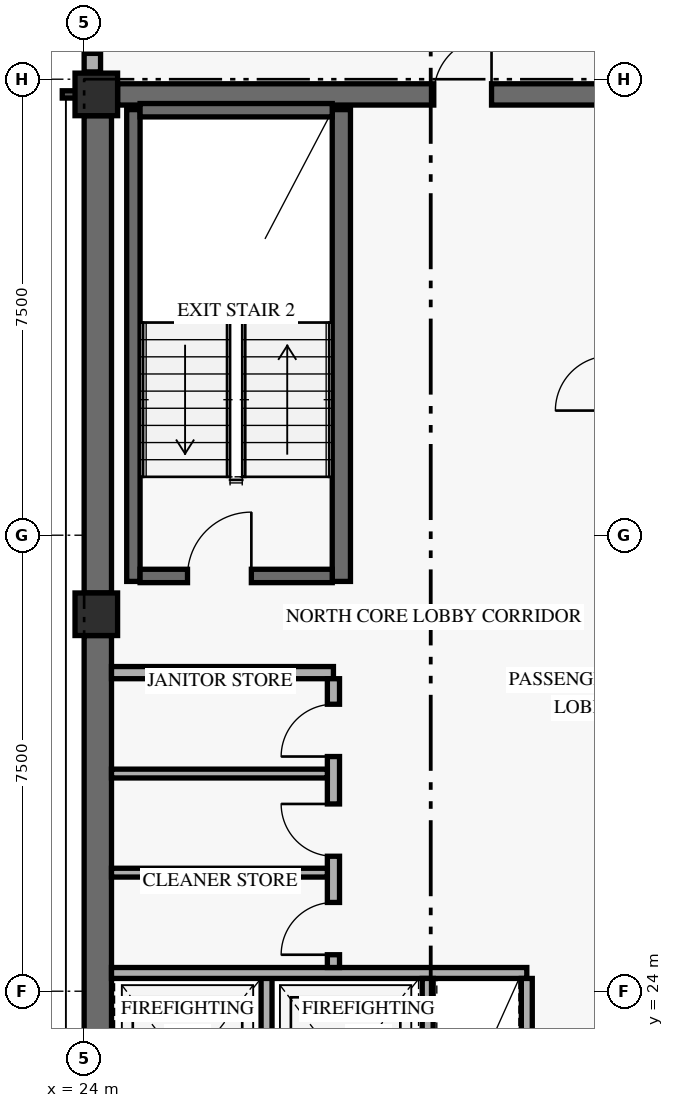
"""IFC4 building model, lengths in metres.
Left out: names, types, materials, properties, quantities, classifications, styles, units other than length and angle.
Written with IfcOpenShell. Run it as: python <this file> out.ifc"""

import sys

from ifc_helpers import new_model, si_unit, direction, frame, frame_2d, origin, origin_2d, place, context, subcontext, project, spatial, rectangle, extrude, element, fill, save


model = new_model("IFC4")
c1 = context("Model", 3, precision=1e-05, world=origin(), true_north=direction((0.0, 1.0)))
c2 = subcontext(c1, "Body", "Model", "MODEL_VIEW")
j1 = project(units=[si_unit("LENGTHUNIT", "METRE"), si_unit("PLANEANGLEUNIT", "RADIAN")], contexts=[c1])
p1 = place(None, origin())
s1 = spatial("IfcSite", under=j1, at=p1, CompositionType="ELEMENT")
p2 = place(p1, origin())
s2 = spatial("IfcBuilding", under=s1, at=p2, CompositionType="ELEMENT")
p3 = place(p2, frame((0.0, 0.0, 256.8)))
s3 = spatial("IfcBuildingStorey", under=s2, at=p3, CompositionType="ELEMENT", Elevation=256.8)
p4 = place(p3, frame((24.225, 17.9, 0.0), z_axis=(0.0, 0.0, 1.0), x_axis=(0.0, 1.0, 0.0)))
e1 = element("IfcWall", 1, at=p4, inside=s3, PredefinedType="SHEAR", context=c2, shape_type="SweptSolid", body=[
    extrude(rectangle(XDim=11.95, YDim=0.45, at=frame_2d((5.975, 0.0))), origin(), (0.0, 0.0, 1.0), 2.821),
])
p5 = place(p3, frame((24.225, 30.55, 0.0), z_axis=(0.0, 0.0, 1.0), x_axis=(0.0, 1.0, 0.0)))
e2 = element("IfcWall", 2, at=p5, inside=s3, PredefinedType="SHEAR", context=c2, shape_type="SweptSolid", body=[
    extrude(rectangle(XDim=7.85, YDim=0.45, at=frame_2d((3.925, 0.0))), origin(), (0.0, 0.0, 1.0), 2.821),
])
p6 = place(p3, frame((24.55, 38.75, 0.0), z_axis=(0.0, 0.0, 1.0), x_axis=(1.0, 0.0, 0.0)))
e3 = element("IfcWall", 3, at=p6, inside=s3, PredefinedType="SHEAR", context=c2, shape_type="SweptSolid", body=[
    extrude(rectangle(XDim=10.3, YDim=0.35, at=frame_2d((5.15, 0.0))), origin(), (0.0, 0.0, 1.0), 3.36),
])
p7 = place(p6, frame((5.2, 0.0, 0.0)))
e4 = element("IfcOpeningElement", 4, at=p7, cuts=e3, PredefinedType="OPENING", context=c2, shape_type="SweptSolid", body=[
    extrude(rectangle(XDim=0.95, YDim=2.15, at=frame_2d((0.475, 1.075))), frame((0.0, 0.185, 0.0), z_axis=(0.0, -1.0, 0.0), x_axis=(1.0, 0.0, 0.0)), (0.0, 0.0, 1.0), 0.37),
])
p8 = place(p3, frame((24.81, 30.74, 0.0), z_axis=(0.0, 0.0, 1.0), x_axis=(0.0, 1.0, 0.0)))
e5 = element("IfcWall", 5, at=p8, inside=s3, PredefinedType="SHEAR", context=c2, shape_type="SweptSolid", body=[
    extrude(rectangle(XDim=7.76, YDim=0.22, at=frame_2d((3.88, 0.0))), origin(), (0.0, 0.0, 1.0), 3.36),
])
p9 = place(p3, frame((28.23, 30.74, 0.0), z_axis=(0.0, 0.0, 1.0), x_axis=(0.0, 1.0, 0.0)))
e6 = element("IfcWall", 6, at=p9, inside=s3, PredefinedType="SHEAR", context=c2, shape_type="SweptSolid", body=[
    extrude(rectangle(XDim=7.76, YDim=0.3, at=frame_2d((3.88, 0.0))), origin(), (0.0, 0.0, 1.0), 3.36),
])
p10 = place(p3, frame((24.92, 30.83, 0.0), z_axis=(0.0, 0.0, 1.0), x_axis=(1.0, 0.0, 0.0)))
e7 = element("IfcWall", 7, at=p10, inside=s3, PredefinedType="SHEAR", context=c2, shape_type="SweptSolid", body=[
    extrude(rectangle(XDim=3.16, YDim=0.22, at=frame_2d((1.58, 0.0))), origin(), (0.0, 0.0, 1.0), 3.36),
])
p11 = place(p10, frame((0.78, 0.0, 0.0)))
e8 = element("IfcOpeningElement", 8, at=p11, cuts=e7, PredefinedType="OPENING", context=c2, shape_type="SweptSolid", body=[
    extrude(rectangle(XDim=1.05, YDim=2.15, at=frame_2d((0.525, 1.075))), frame((0.0, 0.12, 0.0), z_axis=(0.0, -1.0, 0.0), x_axis=(1.0, 0.0, 0.0)), (0.0, 0.0, 1.0), 0.24),
])
p12 = place(p3, frame((24.92, 38.49, 0.0), z_axis=(0.0, 0.0, 1.0), x_axis=(1.0, 0.0, 0.0)))
e9 = element("IfcWall", 9, at=p12, inside=s3, PredefinedType="SHEAR", context=c2, shape_type="SweptSolid", body=[
    extrude(rectangle(XDim=3.16, YDim=0.22, at=frame_2d((1.58, 0.0))), origin(), (0.0, 0.0, 1.0), 3.36),
])
for number, where, z_axis, x_axis in (
    (10, (24.2, 30.2, 0.0), (0.0, 0.0, 1.0), (1.0, 0.0, 0.0)),
    (11, (24.2, 38.75, 0.0), (0.0, 0.0, 1.0), (1.0, 0.0, 0.0)),
):
    element("IfcColumn", number, at=place(p3, frame(where, z_axis=z_axis, x_axis=x_axis)), inside=s3, PredefinedType="COLUMN", context=c2, shape_type="SweptSolid", body=[
        extrude(rectangle(XDim=0.7, YDim=0.7, at=origin_2d()), origin(), (0.0, 0.0, 1.0), 3.6),
    ])
p13 = place(p3, frame((24.135, 39.12, 0.0), z_axis=(0.0, 0.0, 1.0), x_axis=(0.0, 1.0, 0.0)))
e12 = element("IfcWall", 12, at=p13, inside=s3, PredefinedType="SOLIDWALL", context=c2, shape_type="SweptSolid", body=[
    extrude(rectangle(XDim=1.56, YDim=0.27, at=frame_2d((0.78, 0.0))), origin(), (0.0, 0.0, 1.0), 2.803),
])
p14 = place(p13, frame((0.305, 0.0, 0.85)))
e13 = element("IfcOpeningElement", 13, at=p14, cuts=e12, PredefinedType="OPENING", context=c2, shape_type="SweptSolid", body=[
    extrude(rectangle(XDim=0.95, YDim=1.5, at=frame_2d((0.475, 0.75))), frame((0.0, 0.145, 0.0), z_axis=(0.0, -1.0, 0.0), x_axis=(1.0, 0.0, 0.0)), (0.0, 0.0, 1.0), 0.29),
])
p15 = place(p3, frame((27.0, 21.19, 0.0), z_axis=(0.0, 0.0, 1.0), x_axis=(0.0, 1.0, 0.0)))
e14 = element("IfcWall", 14, at=p15, inside=s3, PredefinedType="STANDARD", context=c2, shape_type="SweptSolid", body=[
    extrude(rectangle(XDim=3.11, YDim=0.18, at=frame_2d((1.555, 0.0))), origin(), (0.0, 0.0, 1.0), 3.36),
])
p16 = place(p3, frame((24.45, 24.3, 0.0), z_axis=(0.0, 0.0, 1.0), x_axis=(1.0, 0.0, 0.0)))
e15 = element("IfcWall", 15, at=p16, inside=s3, PredefinedType="STANDARD", context=c2, shape_type="SweptSolid", body=[
    extrude(rectangle(XDim=6.83, YDim=0.18, at=frame_2d((3.415, 0.0))), origin(), (0.0, 0.0, 1.0), 3.36),
])
for number, where, z_axis, x_axis in (
    (16, (29.65, 21.19, 0.0), (0.0, 0.0, 1.0), (0.0, 1.0, 0.0)),
    (17, (31.28, 21.19, 0.0), (0.0, 0.0, 1.0), (0.0, 1.0, 0.0)),
):
    element("IfcWall", number, at=place(p3, frame(where, z_axis=z_axis, x_axis=x_axis)), inside=s3, PredefinedType="STANDARD", context=c2, shape_type="SweptSolid", body=[
        extrude(rectangle(XDim=3.02, YDim=0.18, at=frame_2d((1.51, 0.0))), origin(), (0.0, 0.0, 1.0), 3.36),
    ])
p17 = place(p3, frame((24.45, 29.24, 0.0), z_axis=(0.0, 0.0, 1.0), x_axis=(1.0, 0.0, 0.0)))
e18 = element("IfcWall", 18, at=p17, inside=s3, PredefinedType="STANDARD", context=c2, shape_type="SweptSolid", body=[
    extrude(rectangle(XDim=3.65, YDim=0.2, at=frame_2d((1.825, 0.0))), origin(), (0.0, 0.0, 1.0), 3.36),
])
p18 = place(p3, frame((28.1, 24.39, 0.0), z_axis=(0.0, 0.0, 1.0), x_axis=(0.0, 1.0, 0.0)))
e19 = element("IfcWall", 19, at=p18, inside=s3, PredefinedType="STANDARD", context=c2, shape_type="SweptSolid", body=[
    extrude(rectangle(XDim=4.75, YDim=0.2, at=frame_2d((2.375, 0.0))), origin(), (0.0, 0.0, 1.0), 3.36),
])
p19 = place(p18, frame((0.21, 0.0, 0.0)))
e20 = element("IfcOpeningElement", 20, at=p19, cuts=e19, PredefinedType="OPENING", context=c2, shape_type="SweptSolid", body=[
    extrude(rectangle(XDim=0.86, YDim=2.1, at=frame_2d((0.43, 1.05))), frame((0.0, 0.11, 0.0), z_axis=(0.0, -1.0, 0.0), x_axis=(1.0, 0.0, 0.0)), (0.0, 0.0, 1.0), 0.22),
])
p20 = place(p18, frame((1.83, 0.0, 0.0)))
e21 = element("IfcOpeningElement", 21, at=p20, cuts=e19, PredefinedType="OPENING", context=c2, shape_type="SweptSolid", body=[
    extrude(rectangle(XDim=0.86, YDim=2.1, at=frame_2d((0.43, 1.05))), frame((0.0, 0.11, 0.0), z_axis=(0.0, -1.0, 0.0), x_axis=(1.0, 0.0, 0.0)), (0.0, 0.0, 1.0), 0.22),
])
p21 = place(p18, frame((3.47, 0.0, 0.0)))
e22 = element("IfcOpeningElement", 22, at=p21, cuts=e19, PredefinedType="OPENING", context=c2, shape_type="SweptSolid", body=[
    extrude(rectangle(XDim=0.86, YDim=2.1, at=frame_2d((0.43, 1.05))), frame((0.0, 0.11, 0.0), z_axis=(0.0, -1.0, 0.0), x_axis=(1.0, 0.0, 0.0)), (0.0, 0.0, 1.0), 0.22),
])
for number, where, z_axis, x_axis in (
    (23, (24.45, 25.95, 0.0), (0.0, 0.0, 1.0), (1.0, 0.0, 0.0)),
    (24, (24.45, 27.58, 0.0), (0.0, 0.0, 1.0), (1.0, 0.0, 0.0)),
):
    element("IfcWall", number, at=place(p3, frame(where, z_axis=z_axis, x_axis=x_axis)), inside=s3, PredefinedType="PARTITIONING", context=c2, shape_type="SweptSolid", body=[
        extrude(rectangle(XDim=3.55, YDim=0.145, at=frame_2d((1.775, 0.0))), origin(), (0.0, 0.0, 1.0), 3.36),
    ])
p22 = place(p14, origin())
e25 = element("IfcWindow", 25, at=p22, inside=s3, PartitioningType="SINGLE_PANEL", PredefinedType="WINDOW", context=c2, shape_type="SweptSolid", body=[
    extrude(rectangle(XDim=0.95, YDim=1.5, at=frame_2d((0.475, 0.75))), frame((0.0, 0.03, 0.0), z_axis=(0.0, -1.0, 0.0), x_axis=(1.0, 0.0, 0.0)), (0.0, 0.0, 1.0), 0.06),
])
fill(e13, e25)
p23 = place(p11, origin())
e26 = element("IfcDoor", 26, at=p23, inside=s3, OperationType="SINGLE_SWING_RIGHT", PredefinedType="DOOR", context=c2, shape_type="SweptSolid", body=[
    extrude(rectangle(XDim=1.05, YDim=2.15, at=frame_2d((0.525, 1.075))), frame((0.0, 0.025, 0.0), z_axis=(0.0, -1.0, 0.0), x_axis=(1.0, 0.0, 0.0)), (0.0, 0.0, 1.0), 0.05),
])
fill(e8, e26)
p24 = place(p19, origin())
e27 = element("IfcDoor", 27, at=p24, inside=s3, OperationType="SINGLE_SWING_LEFT", PredefinedType="DOOR", context=c2, shape_type="SweptSolid", body=[
    extrude(rectangle(XDim=0.86, YDim=2.1, at=frame_2d((0.43, 1.05))), frame((0.0, 0.025, 0.0), z_axis=(0.0, -1.0, 0.0), x_axis=(1.0, 0.0, 0.0)), (0.0, 0.0, 1.0), 0.05),
])
fill(e20, e27)
p25 = place(p20, origin())
e28 = element("IfcDoor", 28, at=p25, inside=s3, OperationType="SINGLE_SWING_RIGHT", PredefinedType="DOOR", context=c2, shape_type="SweptSolid", body=[
    extrude(rectangle(XDim=0.86, YDim=2.1, at=frame_2d((0.43, 1.05))), frame((0.0, 0.025, 0.0), z_axis=(0.0, -1.0, 0.0), x_axis=(1.0, 0.0, 0.0)), (0.0, 0.0, 1.0), 0.05),
])
fill(e21, e28)
p26 = place(p21, origin())
e29 = element("IfcDoor", 29, at=p26, inside=s3, OperationType="SINGLE_SWING_LEFT", PredefinedType="DOOR", context=c2, shape_type="SweptSolid", body=[
    extrude(rectangle(XDim=0.86, YDim=2.1, at=frame_2d((0.43, 1.05))), frame((0.0, 0.025, 0.0), z_axis=(0.0, -1.0, 0.0), x_axis=(1.0, 0.0, 0.0)), (0.0, 0.0, 1.0), 0.05),
])
fill(e22, e29)
p27 = place(p7, origin())
e30 = element("IfcDoor", 30, at=p27, inside=s3, OperationType="SINGLE_SWING_RIGHT", PredefinedType="DOOR", context=c2, shape_type="SweptSolid", body=[
    extrude(rectangle(XDim=0.95, YDim=2.15, at=frame_2d((0.475, 1.075))), frame((0.0, 0.025, 0.0), z_axis=(0.0, -1.0, 0.0), x_axis=(1.0, 0.0, 0.0)), (0.0, 0.0, 1.0), 0.05),
])
fill(e4, e30)
save(model, sys.argv[1])
